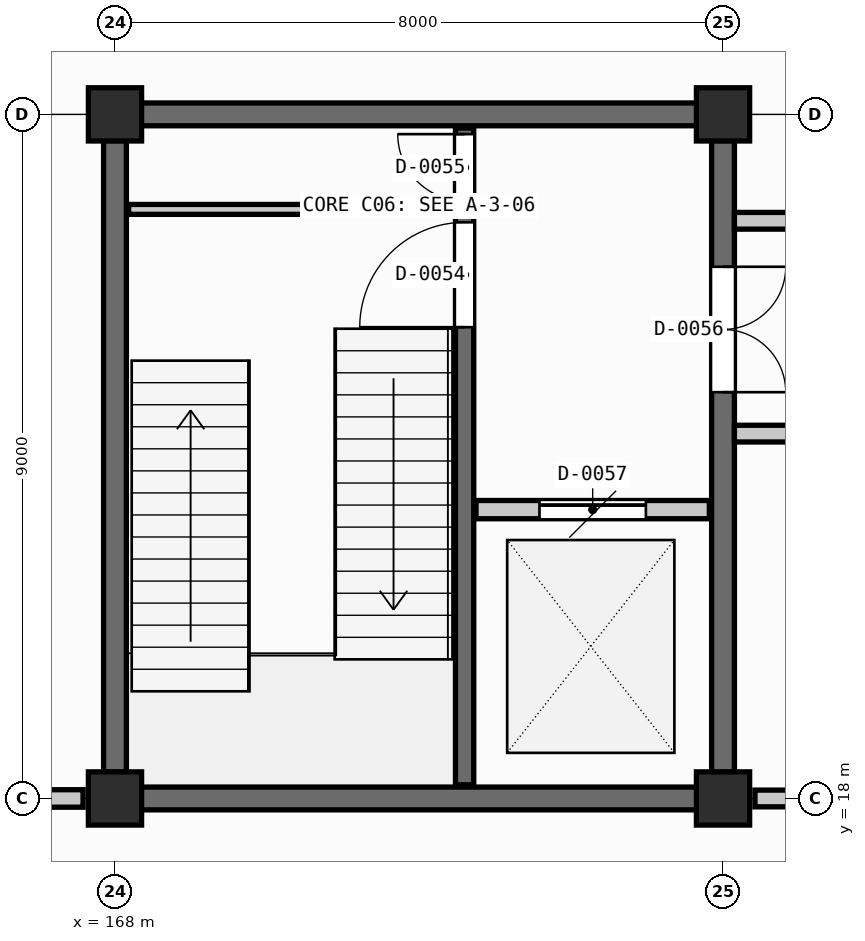
"""IFC4 building model, lengths in metres.
Left out: names, types, materials, properties, quantities, classifications, styles, units other than length and angle.
Written with IfcOpenShell. Run it as: python <this file> out.ifc"""

import sys

from ifc_helpers import new_model, si_unit, direction, frame, frame_2d, origin, origin_2d, place, context, subcontext, project, spatial, rectangle, extrude, element, fill, save


model = new_model("IFC4")
c1 = context("Model", 3, precision=1e-05, world=origin(), true_north=direction((0.0, 1.0)))
c2 = subcontext(c1, "Body", "Model", "MODEL_VIEW")
j1 = project(units=[si_unit("LENGTHUNIT", "METRE"), si_unit("PLANEANGLEUNIT", "RADIAN")], contexts=[c1])
p1 = place(None, origin())
s1 = spatial("IfcSite", under=j1, at=p1, CompositionType="ELEMENT")
p2 = place(p1, origin())
s2 = spatial("IfcBuilding", under=s1, at=p2, CompositionType="ELEMENT")
p3 = place(p2, origin())
s3 = spatial("IfcBuildingStorey", under=s2, at=p3, CompositionType="ELEMENT", Elevation=0.0)
for number, where, z_axis, x_axis in (
    (1, (168.0, 18.0, -1.25), (0.0, 0.0, 1.0), (1.0, 0.0, 0.0)),
    (2, (168.0, 27.0, -1.25), (0.0, 0.0, 1.0), (1.0, 0.0, 0.0)),
    (3, (176.0, 18.0, -1.25), (0.0, 0.0, 1.0), (1.0, 0.0, 0.0)),
    (4, (176.0, 27.0, -1.25), (0.0, 0.0, 1.0), (1.0, 0.0, 0.0)),
):
    element("IfcColumn", number, at=place(p3, frame(where, z_axis=z_axis, x_axis=x_axis)), inside=s3, PredefinedType="COLUMN", context=c2, shape_type="SweptSolid", body=[
        extrude(rectangle(XDim=0.7, YDim=0.7, at=origin_2d()), origin(), (0.0, 0.0, 1.0), 6.05),
    ])
for number, where, z_axis, x_axis in (
    (5, (168.345, 18.0, -1.25), (0.0, 0.0, 1.0), (1.0, 0.0, 0.0)),
    (6, (168.345, 27.0, -1.25), (0.0, 0.0, 1.0), (1.0, 0.0, 0.0)),
):
    element("IfcWall", number, at=place(p3, frame(where, z_axis=z_axis, x_axis=x_axis)), inside=s3, PredefinedType="SHEAR", context=c2, shape_type="SweptSolid", body=[
        extrude(rectangle(XDim=7.31, YDim=0.3, at=frame_2d((3.655, 0.0))), origin(), (0.0, 0.0, 1.0), 5.755),
    ])
p4 = place(p3, frame((168.0, 18.345, -1.25), z_axis=(0.0, 0.0, 1.0), x_axis=(0.0, 1.0, 0.0)))
e7 = element("IfcWall", 7, at=p4, inside=s3, PredefinedType="SHEAR", context=c2, shape_type="SweptSolid", body=[
    extrude(rectangle(XDim=8.31, YDim=0.3, at=frame_2d((4.155, 0.0))), origin(), (0.0, 0.0, 1.0), 5.755),
])
p5 = place(p3, frame((176.0, 18.345, -1.25), z_axis=(0.0, 0.0, 1.0), x_axis=(0.0, 1.0, 0.0)))
e8 = element("IfcWall", 8, at=p5, inside=s3, PredefinedType="SHEAR", context=c2, shape_type="SweptSolid", body=[
    extrude(rectangle(XDim=8.31, YDim=0.3, at=frame_2d((4.155, 0.0))), origin(), (0.0, 0.0, 1.0), 5.755),
])
p6 = place(p5, frame((5.0, 0.0, 1.25)))
e9 = element("IfcOpeningElement", 9, at=p6, cuts=e8, PredefinedType="OPENING", context=c2, shape_type="SweptSolid", body=[
    extrude(rectangle(XDim=1.65, YDim=2.22, at=frame_2d((0.825, 1.11))), frame((0.0, 0.16, 0.0), z_axis=(0.0, -1.0, 0.0), x_axis=(1.0, 0.0, 0.0)), (0.0, 0.0, 1.0), 0.32),
])
p7 = place(p3, frame((172.6, 18.18, -1.25), z_axis=(0.0, 0.0, 1.0), x_axis=(0.0, 1.0, 0.0)))
e10 = element("IfcWall", 10, at=p7, inside=s3, PredefinedType="SHEAR", context=c2, shape_type="SweptSolid", body=[
    extrude(rectangle(XDim=8.64, YDim=0.24, at=frame_2d((4.32, 0.0))), origin(), (0.0, 0.0, 1.0), 5.755),
])
p8 = place(p7, frame((6.02, 0.0, 1.25)))
e11 = element("IfcOpeningElement", 11, at=p8, cuts=e10, PredefinedType="OPENING", context=c2, shape_type="SweptSolid", body=[
    extrude(rectangle(XDim=1.38, YDim=2.22, at=frame_2d((0.69, 1.11))), frame((0.0, 0.13, 0.0), z_axis=(0.0, -1.0, 0.0), x_axis=(1.0, 0.0, 0.0)), (0.0, 0.0, 1.0), 0.26),
])
p9 = place(p7, frame((7.68, 0.0, 1.25)))
e12 = element("IfcOpeningElement", 12, at=p9, cuts=e10, PredefinedType="OPENING", context=c2, shape_type="SweptSolid", body=[
    extrude(rectangle(XDim=0.88, YDim=2.02, at=frame_2d((0.44, 1.01))), frame((0.0, 0.13, 0.0), z_axis=(0.0, -1.0, 0.0), x_axis=(1.0, 0.0, 0.0)), (0.0, 0.0, 1.0), 0.26),
])
p10 = place(p3, frame((168.18, 25.75, 0.0), z_axis=(0.0, 0.0, 1.0), x_axis=(1.0, 0.0, 0.0)))
e13 = element("IfcWall", 13, at=p10, inside=s3, PredefinedType="PARTITIONING", context=c2, shape_type="SweptSolid", body=[
    extrude(rectangle(XDim=4.28, YDim=0.13, at=frame_2d((2.14, 0.0))), origin(), (0.0, 0.0, 1.0), 3.855),
])
p11 = place(p3, frame((172.75, 21.8, 0.0), z_axis=(0.0, 0.0, 1.0), x_axis=(1.0, 0.0, 0.0)))
e14 = element("IfcWall", 14, at=p11, inside=s3, PredefinedType="SHEAR", context=c2, shape_type="SweptSolid", body=[
    extrude(rectangle(XDim=3.07, YDim=0.24, at=frame_2d((1.535, 0.0))), origin(), (0.0, 0.0, 1.0), 3.855),
])
p12 = place(p11, frame((0.835, 0.0, 0.0)))
e15 = element("IfcOpeningElement", 15, at=p12, cuts=e14, PredefinedType="OPENING", context=c2, shape_type="SweptSolid", body=[
    extrude(rectangle(XDim=1.4, YDim=2.3, at=frame_2d((0.7, 1.15))), frame((0.0, 0.13, 0.0), z_axis=(0.0, -1.0, 0.0), x_axis=(1.0, 0.0, 0.0)), (0.0, 0.0, 1.0), 0.26),
])
p13 = place(p3, frame((160.42, 18.0, 0.0), z_axis=(0.0, 0.0, 1.0), x_axis=(1.0, 0.0, 0.0)))
e16 = element("IfcWall", 16, at=p13, inside=s3, PredefinedType="PARTITIONING", context=c2, shape_type="SweptSolid", body=[
    extrude(rectangle(XDim=7.16, YDim=0.23, at=frame_2d((3.58, 0.0))), origin(), (0.0, 0.0, 1.0), 3.55),
])
p14 = place(p3, frame((176.42, 18.0, 0.0), z_axis=(0.0, 0.0, 1.0), x_axis=(1.0, 0.0, 0.0)))
e17 = element("IfcWall", 17, at=p14, inside=s3, PredefinedType="SOLIDWALL", context=c2, shape_type="SweptSolid", body=[
    extrude(rectangle(XDim=7.16, YDim=0.22, at=frame_2d((3.58, 0.0))), origin(), (0.0, 0.0, 1.0), 3.55),
])
p15 = place(p14, frame((2.78, 0.0, 0.0)))
e18 = element("IfcOpeningElement", 18, at=p15, cuts=e17, PredefinedType="OPENING", context=c2, shape_type="SweptSolid", body=[
    extrude(rectangle(XDim=1.6, YDim=2.28, at=frame_2d((0.8, 1.14))), frame((0.0, 0.12, 0.0), z_axis=(0.0, -1.0, 0.0), x_axis=(1.0, 0.0, 0.0)), (0.0, 0.0, 1.0), 0.24),
])
for number, where, z_axis, x_axis in (
    (19, (176.15, 22.8, 0.0), (0.0, 0.0, 1.0), (1.0, 0.0, 0.0)),
    (20, (176.15, 25.6, 0.0), (0.0, 0.0, 1.0), (1.0, 0.0, 0.0)),
):
    element("IfcWall", number, at=place(p3, frame(where, z_axis=z_axis, x_axis=x_axis)), inside=s3, PredefinedType="SOLIDWALL", context=c2, shape_type="SweptSolid", body=[
        extrude(rectangle(XDim=15.68, YDim=0.22, at=frame_2d((7.84, 0.0))), origin(), (0.0, 0.0, 1.0), 3.65),
    ])
p16 = place(p8, origin())
e21 = element("IfcDoor", 21, at=p16, inside=s3, OperationType="SINGLE_SWING_LEFT", PredefinedType="DOOR", context=c2, shape_type="SweptSolid", body=[
    extrude(rectangle(XDim=1.38, YDim=2.22, at=frame_2d((0.69, 1.11))), frame((0.0, 0.025, 0.0), z_axis=(0.0, -1.0, 0.0), x_axis=(1.0, 0.0, 0.0)), (0.0, 0.0, 1.0), 0.05),
])
fill(e11, e21)
p17 = place(p9, origin())
e22 = element("IfcDoor", 22, at=p17, inside=s3, OperationType="SINGLE_SWING_RIGHT", PredefinedType="DOOR", context=c2, shape_type="SweptSolid", body=[
    extrude(rectangle(XDim=0.88, YDim=2.02, at=frame_2d((0.44, 1.01))), frame((0.0, 0.025, 0.0), z_axis=(0.0, -1.0, 0.0), x_axis=(1.0, 0.0, 0.0)), (0.0, 0.0, 1.0), 0.05),
])
fill(e12, e22)
p18 = place(p6, frame((1.65, 0.0, 0.0), z_axis=(0.0, 0.0, 1.0), x_axis=(-1.0, 0.0, 0.0)))
e23 = element("IfcDoor", 23, at=p18, inside=s3, OperationType="DOUBLE_DOOR_SINGLE_SWING", PredefinedType="DOOR", context=c2, shape_type="SweptSolid", body=[
    extrude(rectangle(XDim=1.65, YDim=2.22, at=frame_2d((0.825, 1.11))), frame((0.0, 0.025, 0.0), z_axis=(0.0, -1.0, 0.0), x_axis=(1.0, 0.0, 0.0)), (0.0, 0.0, 1.0), 0.05),
])
fill(e9, e23)
p19 = place(p12, origin())
e24 = element("IfcDoor", 24, at=p19, inside=s3, OperationType="SLIDING_TO_LEFT", PredefinedType="DOOR", context=c2, shape_type="SweptSolid", body=[
    extrude(rectangle(XDim=1.4, YDim=2.3, at=frame_2d((0.7, 1.15))), frame((0.0, 0.025, 0.0), z_axis=(0.0, -1.0, 0.0), x_axis=(1.0, 0.0, 0.0)), (0.0, 0.0, 1.0), 0.05),
])
fill(e15, e24)
save(model, sys.argv[1])
